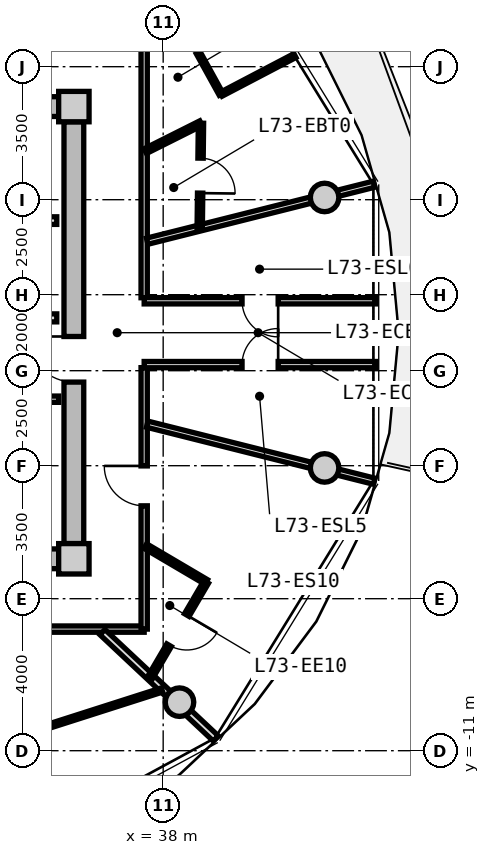
"""IFC4 building model, lengths in metres.
Left out: names, types, materials, properties, quantities, classifications, styles, units other than length and angle.
Written with IfcOpenShell. Run it as: python <this file> out.ifc"""

import sys

from ifc_helpers import new_model, si_unit, direction, frame, frame_2d, origin, origin_2d, place, context, subcontext, project, spatial, rectangle, circle, extrude, source, transform, mapped, element, fill, save


model = new_model("IFC4")
c1 = context("Model", 3, precision=1e-05, world=origin(), true_north=direction((0.0, 1.0)))
c2 = subcontext(c1, "Body", "Model", "MODEL_VIEW")
j1 = project(units=[si_unit("LENGTHUNIT", "METRE"), si_unit("PLANEANGLEUNIT", "RADIAN")], contexts=[c1])
p1 = place(None, origin())
s1 = spatial("IfcSite", under=j1, at=p1, CompositionType="ELEMENT")
p2 = place(p1, origin())
s2 = spatial("IfcBuilding", under=s1, at=p2, CompositionType="ELEMENT")
p3 = place(p2, frame((0.0, 0.0, 235.25)))
s3 = spatial("IfcBuildingStorey", under=s2, at=p3, CompositionType="ELEMENT", Elevation=235.25)
m1 = source(origin(), c2, "Body", "SweptSolid", [
    extrude(rectangle(XDim=0.8, YDim=0.8, at=origin_2d()), origin(), (0.0, 0.0, 1.0), 3.05),
])
for number, where, z_axis, x_axis in (
    (1, (35.65, -5.95, 0.0), (0.0, 0.0, 1.0), (1.0, 0.0, 0.0)),
    (2, (35.65, 5.95, 0.0), (0.0, 0.0, 1.0), (1.0, 0.0, 0.0)),
):
    element("IfcColumn", number, at=place(p3, frame(where, z_axis=z_axis, x_axis=x_axis)), inside=s3, PredefinedType="COLUMN", context=c2, shape_type="MappedRepresentation", body=[
        mapped(m1, transform((0.0, 0.0, 0.0), x_axis=(1.0, 0.0, 0.0), y_axis=(0.0, 1.0, 0.0), z_axis=(0.0, 0.0, 1.0), scale=1.0)),
    ])
m2 = source(origin(), c2, "Body", "SweptSolid", [
    extrude(rectangle(XDim=14.5, YDim=0.52, at=frame_2d((7.25, 0.0))), origin(), (0.0, 0.0, 1.0), 2.81),
])
for number, where, z_axis, x_axis in (
    (3, (20.75, 5.95, 0.0), (0.0, 0.0, 1.0), (1.0, 0.0, 0.0)),
    (4, (35.25, -5.95, 0.0), (0.0, 0.0, 1.0), (-1.0, 0.0, 0.0)),
):
    element("IfcWall", number, at=place(p3, frame(where, z_axis=z_axis, x_axis=x_axis)), inside=s3, PredefinedType="SHEAR", context=c2, shape_type="MappedRepresentation", body=[
        mapped(m2, transform((0.0, 0.0, 0.0), x_axis=(1.0, 0.0, 0.0), y_axis=(0.0, 1.0, 0.0), z_axis=(0.0, 0.0, 1.0), scale=1.0)),
    ])
m3 = source(origin(), c2, "Body", "SweptSolid", [
    extrude(rectangle(XDim=11.1, YDim=0.52, at=frame_2d((5.55, 0.0))), origin(), (0.0, 0.0, 1.0), 2.81),
])
p4 = place(p3, frame((35.65, 5.55, 0.0), z_axis=(0.0, 0.0, 1.0), x_axis=(0.0, -1.0, 0.0)))
e5 = element("IfcWall", 5, at=p4, inside=s3, PredefinedType="SHEAR", context=c2, shape_type="MappedRepresentation", body=[
    mapped(m3, transform((0.0, 0.0, 0.0), x_axis=(1.0, 0.0, 0.0), y_axis=(0.0, 1.0, 0.0), z_axis=(0.0, 0.0, 1.0), scale=1.0)),
])
p5 = place(p4, frame((5.65, 0.0, 0.0)))
e6 = element("IfcOpeningElement", 6, at=p5, cuts=e5, PredefinedType="OPENING", context=c2, shape_type="SweptSolid", body=[
    extrude(rectangle(XDim=1.2, YDim=2.15, at=frame_2d((0.6, 1.075))), frame((0.0, 0.27, 0.0), z_axis=(0.0, -1.0, 0.0), x_axis=(1.0, 0.0, 0.0)), (0.0, 0.0, 1.0), 0.54),
])
m4 = source(origin(), c2, "Body", "SweptSolid", [
    extrude(circle(Radius=0.375, at=origin_2d()), origin(), (0.0, 0.0, 1.0), 3.05),
])
for number, where, z_axis, x_axis in (
    (7, (42.247, 3.559, 0.0), (0.0, 0.0, 1.0), (1.0, 0.0, 0.0)),
    (8, (38.43, -9.723, 0.0), (0.0, 0.0, 1.0), (1.0, 0.0, 0.0)),
    (9, (42.247, -3.559, 0.0), (0.0, 0.0, 1.0), (1.0, 0.0, 0.0)),
):
    element("IfcColumn", number, at=place(p3, frame(where, z_axis=z_axis, x_axis=x_axis)), inside=s3, PredefinedType="COLUMN", context=c2, shape_type="MappedRepresentation", body=[
        mapped(m4, transform((0.0, 0.0, 0.0), x_axis=(1.0, 0.0, 0.0), y_axis=(0.0, 1.0, 0.0), z_axis=(0.0, 0.0, 1.0), scale=1.0)),
    ])
m5 = source(origin(), c2, "Body", "SweptSolid", [
    extrude(rectangle(XDim=3.2, YDim=0.2, at=frame_2d((1.6, 0.0))), origin(), (0.0, 0.0, 1.0), 2.795),
])
p6 = place(p3, frame((32.0, 2.95, 0.0), z_axis=(0.0, 0.0, 1.0), x_axis=(1.0, 0.0, 0.0)))
e10 = element("IfcWall", 10, at=p6, inside=s3, PredefinedType="PARTITIONING", context=c2, shape_type="MappedRepresentation", body=[
    mapped(m5, transform((0.0, 0.0, 0.0), x_axis=(1.0, 0.0, 0.0), y_axis=(0.0, 1.0, 0.0), z_axis=(0.0, 0.0, 1.0), scale=1.0)),
])
m6 = source(origin(), c2, "Body", "SweptSolid", [
    extrude(rectangle(XDim=6.66, YDim=0.21, at=frame_2d((3.33, 0.0))), origin(), (0.0, 0.0, 1.0), 2.795),
])
p7 = place(p3, frame((28.54, 0.39, 0.0), z_axis=(0.0, 0.0, 1.0), x_axis=(1.0, 0.0, 0.0)))
e11 = element("IfcWall", 11, at=p7, inside=s3, PredefinedType="PARTITIONING", context=c2, shape_type="MappedRepresentation", body=[
    mapped(m6, transform((0.0, 0.0, 0.0), x_axis=(1.0, 0.0, 0.0), y_axis=(0.0, 1.0, 0.0), z_axis=(0.0, 0.0, 1.0), scale=1.0)),
])
p8 = place(p7, frame((1.0, 0.0, 0.0)))
e12 = element("IfcOpeningElement", 12, at=p8, cuts=e11, PredefinedType="OPENING", context=c2, shape_type="SweptSolid", body=[
    extrude(rectangle(XDim=1.2, YDim=2.15, at=frame_2d((0.6, 1.075))), frame((0.0, 0.115, 0.0), z_axis=(0.0, -1.0, 0.0), x_axis=(1.0, 0.0, 0.0)), (0.0, 0.0, 1.0), 0.23),
])
m7 = source(origin(), c2, "Body", "SweptSolid", [
    extrude(rectangle(XDim=2.7, YDim=0.165, at=frame_2d((1.35, 0.0))), origin(), (0.0, 0.0, 1.0), 2.795),
])
p9 = place(p3, frame((32.55, -1.75, 0.0), z_axis=(0.0, 0.0, 1.0), x_axis=(1.0, 0.0, 0.0)))
e13 = element("IfcWall", 13, at=p9, inside=s3, PredefinedType="PARTITIONING", context=c2, shape_type="MappedRepresentation", body=[
    mapped(m7, transform((0.0, 0.0, 0.0), x_axis=(1.0, 0.0, 0.0), y_axis=(0.0, 1.0, 0.0), z_axis=(0.0, 0.0, 1.0), scale=1.0)),
])
p10 = place(p9, frame((0.85, 0.0, 0.0)))
e14 = element("IfcOpeningElement", 14, at=p10, cuts=e13, PredefinedType="OPENING", context=c2, shape_type="SweptSolid", body=[
    extrude(rectangle(XDim=0.925, YDim=2.1, at=frame_2d((0.462, 1.05))), frame((0.0, 0.093, 0.0), z_axis=(0.0, -1.0, 0.0), x_axis=(1.0, 0.0, 0.0)), (0.0, 0.0, 1.0), 0.185),
])
m8 = source(origin(), c2, "Body", "SweptSolid", [
    extrude(rectangle(XDim=19.0, YDim=0.165, at=frame_2d((9.5, 0.0))), origin(), (0.0, 0.0, 1.0), 2.795),
])
p11 = place(p3, frame((37.5, -7.8, 0.0), z_axis=(0.0, 0.0, 1.0), x_axis=(-1.0, 0.0, 0.0)))
e15 = element("IfcWall", 15, at=p11, inside=s3, PredefinedType="PARTITIONING", context=c2, shape_type="MappedRepresentation", body=[
    mapped(m8, transform((0.0, 0.0, 0.0), x_axis=(1.0, 0.0, 0.0), y_axis=(0.0, 1.0, 0.0), z_axis=(0.0, 0.0, 1.0), scale=1.0)),
])
p12 = place(p11, frame((9.392, 0.0, 0.0)))
e16 = element("IfcOpeningElement", 16, at=p12, cuts=e15, PredefinedType="OPENING", context=c2, shape_type="SweptSolid", body=[
    extrude(rectangle(XDim=1.05, YDim=2.15, at=frame_2d((0.525, 1.075))), frame((0.0, 0.093, 0.0), z_axis=(0.0, -1.0, 0.0), x_axis=(1.0, 0.0, 0.0)), (0.0, 0.0, 1.0), 0.185),
])
m9 = source(origin(), c2, "Body", "SweptSolid", [
    extrude(rectangle(XDim=6.88, YDim=0.165, at=frame_2d((3.44, 0.0))), origin(), (0.0, 0.0, 1.0), 2.795),
])
p13 = place(p3, frame((37.5, 7.8, 0.0), z_axis=(0.0, 0.0, 1.0), x_axis=(0.0, -1.0, 0.0)))
e17 = element("IfcWall", 17, at=p13, inside=s3, PredefinedType="PARTITIONING", context=c2, shape_type="MappedRepresentation", body=[
    mapped(m9, transform((0.0, 0.0, 0.0), x_axis=(1.0, 0.0, 0.0), y_axis=(0.0, 1.0, 0.0), z_axis=(0.0, 0.0, 1.0), scale=1.0)),
])
p14 = place(p3, frame((37.5, -0.92, 0.0), z_axis=(0.0, 0.0, 1.0), x_axis=(0.0, -1.0, 0.0)))
e18 = element("IfcWall", 18, at=p14, inside=s3, PredefinedType="PARTITIONING", context=c2, shape_type="MappedRepresentation", body=[
    mapped(m9, transform((0.0, 0.0, 0.0), x_axis=(1.0, 0.0, 0.0), y_axis=(0.0, 1.0, 0.0), z_axis=(0.0, 0.0, 1.0), scale=1.0)),
])
p15 = place(p14, frame((2.586, 0.0, 0.0)))
e19 = element("IfcOpeningElement", 19, at=p15, cuts=e18, PredefinedType="OPENING", context=c2, shape_type="SweptSolid", body=[
    extrude(rectangle(XDim=1.05, YDim=2.15, at=frame_2d((0.525, 1.075))), frame((0.0, 0.093, 0.0), z_axis=(0.0, -1.0, 0.0), x_axis=(1.0, 0.0, 0.0)), (0.0, 0.0, 1.0), 0.185),
])
m10 = source(origin(), c2, "Body", "SweptSolid", [
    extrude(rectangle(XDim=6.157, YDim=0.165, at=frame_2d((3.079, 0.0))), origin(), (0.0, 0.0, 1.0), 2.395),
])
for number, where, z_axis, x_axis in (
    (20, (37.58, -2.407, 0.0), (0.0, 0.0, 1.0), (0.97, -0.244, 0.0)),
    (21, (37.58, 2.407, 0.0), (0.0, 0.0, 1.0), (0.97, 0.244, 0.0)),
):
    element("IfcWall", number, at=place(p3, frame(where, z_axis=z_axis, x_axis=x_axis)), inside=s3, PredefinedType="PARTITIONING", context=c2, shape_type="MappedRepresentation", body=[
        mapped(m10, transform((0.0, 0.0, 0.0), x_axis=(1.0, 0.0, 0.0), y_axis=(0.0, 1.0, 0.0), z_axis=(0.0, 0.0, 1.0), scale=1.0)),
    ])
m11 = source(origin(), c2, "Body", "SweptSolid", [
    extrude(rectangle(XDim=6.101, YDim=0.165, at=frame_2d((3.051, 0.0))), origin(), (0.0, 0.0, 1.0), 2.795),
])
p16 = place(p3, frame((37.5, 0.84, 0.0), z_axis=(0.0, 0.0, 1.0), x_axis=(1.0, 0.0, 0.0)))
e22 = element("IfcWall", 22, at=p16, inside=s3, PredefinedType="PARTITIONING", context=c2, shape_type="MappedRepresentation", body=[
    mapped(m11, transform((0.0, 0.0, 0.0), x_axis=(1.0, 0.0, 0.0), y_axis=(0.0, 1.0, 0.0), z_axis=(0.0, 0.0, 1.0), scale=1.0)),
])
p17 = place(p16, frame((2.576, 0.0, 0.0)))
e23 = element("IfcOpeningElement", 23, at=p17, cuts=e22, PredefinedType="OPENING", context=c2, shape_type="SweptSolid", body=[
    extrude(rectangle(XDim=0.95, YDim=2.1, at=frame_2d((0.475, 1.05))), frame((0.0, 0.093, 0.0), z_axis=(0.0, -1.0, 0.0), x_axis=(1.0, 0.0, 0.0)), (0.0, 0.0, 1.0), 0.185),
])
p18 = place(p3, frame((43.601, -0.84, 0.0), z_axis=(0.0, 0.0, 1.0), x_axis=(-1.0, 0.0, 0.0)))
e24 = element("IfcWall", 24, at=p18, inside=s3, PredefinedType="PARTITIONING", context=c2, shape_type="MappedRepresentation", body=[
    mapped(m11, transform((0.0, 0.0, 0.0), x_axis=(1.0, 0.0, 0.0), y_axis=(0.0, 1.0, 0.0), z_axis=(0.0, 0.0, 1.0), scale=1.0)),
])
p19 = place(p18, frame((2.576, 0.0, 0.0)))
e25 = element("IfcOpeningElement", 25, at=p19, cuts=e24, PredefinedType="OPENING", context=c2, shape_type="SweptSolid", body=[
    extrude(rectangle(XDim=0.95, YDim=2.1, at=frame_2d((0.475, 1.05))), frame((0.0, 0.093, 0.0), z_axis=(0.0, -1.0, 0.0), x_axis=(1.0, 0.0, 0.0)), (0.0, 0.0, 1.0), 0.185),
])
m12 = source(origin(), c2, "Body", "SweptSolid", [
    extrude(rectangle(XDim=1.638, YDim=0.14, at=frame_2d((0.819, 0.0))), origin(), (0.0, 0.0, 1.0), 2.795),
])
p20 = place(p3, frame((37.53, 4.778, 0.0), z_axis=(0.0, 0.0, 1.0), x_axis=(0.893919977945, 0.448226586707, 0.0)))
e26 = element("IfcWall", 26, at=p20, inside=s3, PredefinedType="PARTITIONING", context=c2, shape_type="MappedRepresentation", body=[
    mapped(m12, transform((0.0, 0.0, 0.0), x_axis=(1.0, 0.0, 0.0), y_axis=(0.0, 1.0, 0.0), z_axis=(0.0, 0.0, 1.0), scale=1.0)),
])
m13 = source(origin(), c2, "Body", "SweptSolid", [
    extrude(rectangle(XDim=2.759, YDim=0.14, at=frame_2d((1.379, 0.0))), origin(), (0.0, 0.0, 1.0), 2.795),
])
p21 = place(p3, frame((38.995, 5.513, 0.0), z_axis=(0.0, 0.0, 1.0), x_axis=(-0.01194710728, -0.999928630767, 0.0)))
e27 = element("IfcWall", 27, at=p21, inside=s3, PredefinedType="PARTITIONING", context=c2, shape_type="MappedRepresentation", body=[
    mapped(m13, transform((0.0, 0.0, 0.0), x_axis=(1.0, 0.0, 0.0), y_axis=(0.0, 1.0, 0.0), z_axis=(0.0, 0.0, 1.0), scale=1.0)),
])
p22 = place(p21, frame((0.919, 0.0, 0.0)))
e28 = element("IfcOpeningElement", 28, at=p22, cuts=e27, PredefinedType="OPENING", context=c2, shape_type="SweptSolid", body=[
    extrude(rectangle(XDim=0.92, YDim=2.1, at=frame_2d((0.46, 1.05))), frame((0.0, 0.08, 0.0), z_axis=(0.0, -1.0, 0.0), x_axis=(1.0, 0.0, 0.0)), (0.0, 0.0, 1.0), 0.16),
])
m14 = source(origin(), c2, "Body", "SweptSolid", [
    extrude(rectangle(XDim=2.193, YDim=0.115, at=frame_2d((1.097, 0.0))), origin(), (0.0, 0.0, 1.0), 2.795),
])
p23 = place(p3, frame((39.525, 6.275, 0.0), z_axis=(0.0, 0.0, 1.0), x_axis=(0.885783595046, 0.464098505435, 0.0)))
e29 = element("IfcWall", 29, at=p23, inside=s3, PredefinedType="PARTITIONING", context=c2, shape_type="MappedRepresentation", body=[
    mapped(m14, transform((0.0, 0.0, 0.0), x_axis=(1.0, 0.0, 0.0), y_axis=(0.0, 1.0, 0.0), z_axis=(0.0, 0.0, 1.0), scale=1.0)),
])
m15 = source(origin(), c2, "Body", "SweptSolid", [
    extrude(rectangle(XDim=3.45, YDim=0.115, at=frame_2d((1.725, 0.0))), origin(), (0.0, 0.0, 1.0), 2.795),
])
p24 = place(p3, frame((39.525, 6.275, 0.0), z_axis=(0.0, 0.0, 1.0), x_axis=(-0.483659007882, 0.875256513312, 0.0)))
e30 = element("IfcWall", 30, at=p24, inside=s3, PredefinedType="PARTITIONING", context=c2, shape_type="MappedRepresentation", body=[
    mapped(m15, transform((0.0, 0.0, 0.0), x_axis=(1.0, 0.0, 0.0), y_axis=(0.0, 1.0, 0.0), z_axis=(0.0, 0.0, 1.0), scale=1.0)),
])
p25 = place(p24, frame((1.25, 0.0, 0.0)))
e31 = element("IfcOpeningElement", 31, at=p25, cuts=e30, PredefinedType="OPENING", context=c2, shape_type="SweptSolid", body=[
    extrude(rectangle(XDim=0.95, YDim=2.1, at=frame_2d((0.475, 1.05))), frame((0.0, 0.067, 0.0), z_axis=(0.0, -1.0, 0.0), x_axis=(1.0, 0.0, 0.0)), (0.0, 0.0, 1.0), 0.135),
])
m16 = source(origin(), c2, "Body", "SweptSolid", [
    extrude(rectangle(XDim=4.089, YDim=0.19, at=frame_2d((2.044, 0.0))), origin(), (0.0, 0.0, 1.0), 2.395),
])
p26 = place(p3, frame((36.402, -7.88, 0.0), z_axis=(0.0, 0.0, 1.0), x_axis=(0.729401273609, -0.684086092577, 0.0)))
e32 = element("IfcWall", 32, at=p26, inside=s3, PredefinedType="PARTITIONING", context=c2, shape_type="MappedRepresentation", body=[
    mapped(m16, transform((0.0, 0.0, 0.0), x_axis=(1.0, 0.0, 0.0), y_axis=(0.0, 1.0, 0.0), z_axis=(0.0, 0.0, 1.0), scale=1.0)),
])
m17 = source(origin(), c2, "Body", "SweptSolid", [
    extrude(rectangle(XDim=7.024, YDim=0.115, at=frame_2d((3.512, 0.0))), origin(), (0.0, 0.0, 1.0), 2.795),
])
p27 = place(p3, frame((31.28, -11.542, 0.0), z_axis=(0.0, 0.0, 1.0), x_axis=(0.952454006655, 0.304682400552, 0.0)))
e33 = element("IfcWall", 33, at=p27, inside=s3, PredefinedType="PARTITIONING", context=c2, shape_type="MappedRepresentation", body=[
    mapped(m17, transform((0.0, 0.0, 0.0), x_axis=(1.0, 0.0, 0.0), y_axis=(0.0, 1.0, 0.0), z_axis=(0.0, 0.0, 1.0), scale=1.0)),
])
p28 = place(p27, frame((3.037, 0.0, 0.0)))
e34 = element("IfcOpeningElement", 34, at=p28, cuts=e33, PredefinedType="OPENING", context=c2, shape_type="SweptSolid", body=[
    extrude(rectangle(XDim=0.95, YDim=2.1, at=frame_2d((0.475, 1.05))), frame((0.0, 0.067, 0.0), z_axis=(0.0, -1.0, 0.0), x_axis=(1.0, 0.0, 0.0)), (0.0, 0.0, 1.0), 0.135),
])
m18 = source(origin(), c2, "Body", "SweptSolid", [
    extrude(rectangle(XDim=1.859, YDim=0.14, at=frame_2d((0.93, 0.0))), origin(), (0.0, 0.0, 1.0), 2.795),
])
p29 = place(p3, frame((37.53, -5.615, 0.0), z_axis=(0.0, 0.0, 1.0), x_axis=(0.861555897139, -0.507662718845, 0.0)))
e35 = element("IfcWall", 35, at=p29, inside=s3, PredefinedType="PARTITIONING", context=c2, shape_type="MappedRepresentation", body=[
    mapped(m18, transform((0.0, 0.0, 0.0), x_axis=(1.0, 0.0, 0.0), y_axis=(0.0, 1.0, 0.0), z_axis=(0.0, 0.0, 1.0), scale=1.0)),
])
m19 = source(origin(), c2, "Body", "SweptSolid", [
    extrude(rectangle(XDim=2.939, YDim=0.14, at=frame_2d((1.47, 0.0))), origin(), (0.0, 0.0, 1.0), 2.795),
])
p30 = place(p3, frame((39.132, -6.559, 0.0), z_axis=(0.0, 0.0, 1.0), x_axis=(-0.505883614636, -0.862601743821, 0.0)))
e36 = element("IfcWall", 36, at=p30, inside=s3, PredefinedType="PARTITIONING", context=c2, shape_type="MappedRepresentation", body=[
    mapped(m19, transform((0.0, 0.0, 0.0), x_axis=(1.0, 0.0, 0.0), y_axis=(0.0, 1.0, 0.0), z_axis=(0.0, 0.0, 1.0), scale=1.0)),
])
p31 = place(p30, frame((1.01, 0.0, 0.0)))
e37 = element("IfcOpeningElement", 37, at=p31, cuts=e36, PredefinedType="OPENING", context=c2, shape_type="SweptSolid", body=[
    extrude(rectangle(XDim=0.92, YDim=2.1, at=frame_2d((0.46, 1.05))), frame((0.0, 0.08, 0.0), z_axis=(0.0, -1.0, 0.0), x_axis=(1.0, 0.0, 0.0)), (0.0, 0.0, 1.0), 0.16),
])
m20 = source(origin(), c2, "Body", "SweptSolid", [
    extrude(rectangle(XDim=1.2, YDim=2.15, at=frame_2d((0.6, 1.075))), frame((0.0, 0.025, 0.0), z_axis=(0.0, -1.0, 0.0), x_axis=(1.0, 0.0, 0.0)), (0.0, 0.0, 1.0), 0.05),
])
p32 = place(p5, frame((1.2, 0.0, 0.0), z_axis=(0.0, 0.0, 1.0), x_axis=(-1.0, 0.0, 0.0)))
e38 = element("IfcDoor", 38, at=p32, inside=s3, OperationType="SINGLE_SWING_RIGHT", PredefinedType="DOOR", context=c2, shape_type="MappedRepresentation", body=[
    mapped(m20, transform((0.0, 0.0, 0.0), x_axis=(1.0, 0.0, 0.0), y_axis=(0.0, 1.0, 0.0), z_axis=(0.0, 0.0, 1.0), scale=1.0)),
])
fill(e6, e38)
m21 = source(origin(), c2, "Body", "SweptSolid", [
    extrude(rectangle(XDim=0.95, YDim=2.1, at=frame_2d((0.475, 1.05))), frame((0.0, 0.025, 0.0), z_axis=(0.0, -1.0, 0.0), x_axis=(1.0, 0.0, 0.0)), (0.0, 0.0, 1.0), 0.05),
])
p33 = place(p19, frame((0.95, 0.0, 0.0), z_axis=(0.0, 0.0, 1.0), x_axis=(-1.0, 0.0, 0.0)))
e39 = element("IfcDoor", 39, at=p33, inside=s3, OperationType="SINGLE_SWING_RIGHT", PredefinedType="DOOR", context=c2, shape_type="MappedRepresentation", body=[
    mapped(m21, transform((0.0, 0.0, 0.0), x_axis=(1.0, 0.0, 0.0), y_axis=(0.0, 1.0, 0.0), z_axis=(0.0, 0.0, 1.0), scale=1.0)),
])
fill(e25, e39)
p34 = place(p17, frame((0.95, 0.0, 0.0), z_axis=(0.0, 0.0, 1.0), x_axis=(-1.0, 0.0, 0.0)))
e40 = element("IfcDoor", 40, at=p34, inside=s3, OperationType="SINGLE_SWING_LEFT", PredefinedType="DOOR", context=c2, shape_type="MappedRepresentation", body=[
    mapped(m21, transform((0.0, 0.0, 0.0), x_axis=(1.0, 0.0, 0.0), y_axis=(0.0, 1.0, 0.0), z_axis=(0.0, 0.0, 1.0), scale=1.0)),
])
fill(e23, e40)
m22 = source(origin(), c2, "Body", "SweptSolid", [
    extrude(rectangle(XDim=0.92, YDim=2.1, at=frame_2d((0.46, 1.05))), frame((0.0, 0.025, 0.0), z_axis=(0.0, -1.0, 0.0), x_axis=(1.0, 0.0, 0.0)), (0.0, 0.0, 1.0), 0.05),
])
p35 = place(p22, origin())
e41 = element("IfcDoor", 41, at=p35, inside=s3, OperationType="SINGLE_SWING_RIGHT", PredefinedType="DOOR", context=c2, shape_type="MappedRepresentation", body=[
    mapped(m22, transform((0.0, 0.0, 0.0), x_axis=(1.0, 0.0, 0.0), y_axis=(0.0, 1.0, 0.0), z_axis=(0.0, 0.0, 1.0), scale=1.0)),
])
fill(e28, e41)
p36 = place(p25, frame((0.95, 0.0, 0.0), z_axis=(0.0, 0.0, 1.0), x_axis=(-1.0, 0.0, 0.0)))
e42 = element("IfcDoor", 42, at=p36, inside=s3, OperationType="SINGLE_SWING_LEFT", PredefinedType="DOOR", context=c2, shape_type="MappedRepresentation", body=[
    mapped(m21, transform((0.0, 0.0, 0.0), x_axis=(1.0, 0.0, 0.0), y_axis=(0.0, 1.0, 0.0), z_axis=(0.0, 0.0, 1.0), scale=1.0)),
])
fill(e31, e42)
p37 = place(p28, origin())
e43 = element("IfcDoor", 43, at=p37, inside=s3, OperationType="SINGLE_SWING_RIGHT", PredefinedType="DOOR", context=c2, shape_type="MappedRepresentation", body=[
    mapped(m21, transform((0.0, 0.0, 0.0), x_axis=(1.0, 0.0, 0.0), y_axis=(0.0, 1.0, 0.0), z_axis=(0.0, 0.0, 1.0), scale=1.0)),
])
fill(e34, e43)
m23 = source(origin(), c2, "Body", "SweptSolid", [
    extrude(rectangle(XDim=1.05, YDim=2.15, at=frame_2d((0.525, 1.075))), frame((0.0, 0.025, 0.0), z_axis=(0.0, -1.0, 0.0), x_axis=(1.0, 0.0, 0.0)), (0.0, 0.0, 1.0), 0.05),
])
p38 = place(p15, frame((1.05, 0.0, 0.0), z_axis=(0.0, 0.0, 1.0), x_axis=(-1.0, 0.0, 0.0)))
e44 = element("IfcDoor", 44, at=p38, inside=s3, OperationType="SINGLE_SWING_RIGHT", PredefinedType="DOOR", context=c2, shape_type="MappedRepresentation", body=[
    mapped(m23, transform((0.0, 0.0, 0.0), x_axis=(1.0, 0.0, 0.0), y_axis=(0.0, 1.0, 0.0), z_axis=(0.0, 0.0, 1.0), scale=1.0)),
])
fill(e19, e44)
p39 = place(p31, origin())
e45 = element("IfcDoor", 45, at=p39, inside=s3, OperationType="SINGLE_SWING_LEFT", PredefinedType="DOOR", context=c2, shape_type="MappedRepresentation", body=[
    mapped(m22, transform((0.0, 0.0, 0.0), x_axis=(1.0, 0.0, 0.0), y_axis=(0.0, 1.0, 0.0), z_axis=(0.0, 0.0, 1.0), scale=1.0)),
])
fill(e37, e45)
save(model, sys.argv[1])
